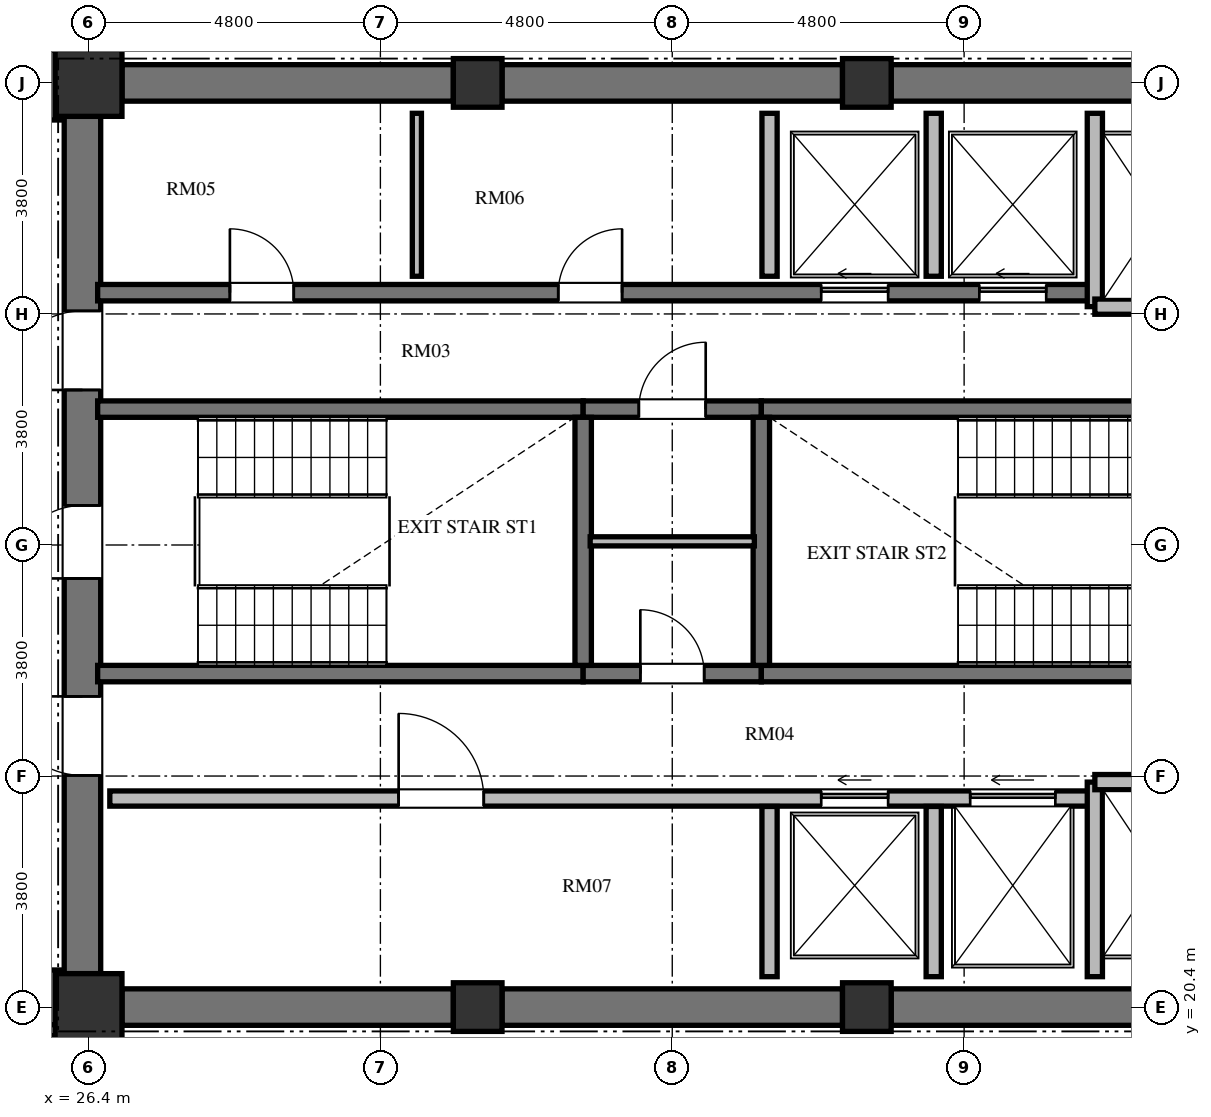
"""IFC4 building model, lengths in metres.
Left out: names, types, materials, properties, quantities, classifications, styles, units other than length and angle.
Written with IfcOpenShell. Run it as: python <this file> out.ifc"""

import sys

from ifc_helpers import new_model, si_unit, direction, frame, frame_2d, origin, origin_2d, place, context, subcontext, project, spatial, rectangle, extrude, element, fill, save


model = new_model("IFC4")
c1 = context("Model", 3, precision=1e-05, world=origin(), true_north=direction((0.0, 1.0)))
c2 = subcontext(c1, "Body", "Model", "MODEL_VIEW")
j1 = project(units=[si_unit("LENGTHUNIT", "METRE"), si_unit("PLANEANGLEUNIT", "RADIAN")], contexts=[c1])
p1 = place(None, origin())
s1 = spatial("IfcSite", under=j1, at=p1, CompositionType="ELEMENT")
p2 = place(p1, origin())
s2 = spatial("IfcBuilding", under=s1, at=p2, CompositionType="ELEMENT")
p3 = place(p2, frame((0.0, 0.0, 205.776)))
s3 = spatial("IfcBuildingStorey", under=s2, at=p3, CompositionType="ELEMENT", Elevation=205.776)
p4 = place(p3, frame((26.4, 20.4, 0.0), z_axis=(0.0, 0.0, 1.0), x_axis=(1.0, 0.0, 0.0)))
e1 = element("IfcColumn", 1, at=p4, inside=s3, PredefinedType="COLUMN", context=c2, shape_type="SweptSolid", body=[
    extrude(rectangle(XDim=1.1, YDim=1.1, at=origin_2d()), origin(), (0.0, 0.0, 1.0), 3.648),
])
for number, where, z_axis, x_axis in (
    (2, (32.8, 20.4, 0.0), (0.0, 0.0, 1.0), (1.0, 0.0, 0.0)),
    (3, (39.2, 20.4, 0.0), (0.0, 0.0, 1.0), (1.0, 0.0, 0.0)),
    (4, (39.2, 35.6, 0.0), (0.0, 0.0, 1.0), (1.0, 0.0, 0.0)),
    (5, (32.8, 35.6, 0.0), (0.0, 0.0, 1.0), (1.0, 0.0, 0.0)),
):
    element("IfcColumn", number, at=place(p3, frame(where, z_axis=z_axis, x_axis=x_axis)), inside=s3, PredefinedType="COLUMN", context=c2, shape_type="SweptSolid", body=[
        extrude(rectangle(XDim=0.8, YDim=0.8, at=origin_2d()), origin(), (0.0, 0.0, 1.0), 3.648),
    ])
p5 = place(p3, frame((26.4, 35.6, 0.0), z_axis=(0.0, 0.0, 1.0), x_axis=(1.0, 0.0, 0.0)))
e6 = element("IfcColumn", 6, at=p5, inside=s3, PredefinedType="COLUMN", context=c2, shape_type="SweptSolid", body=[
    extrude(rectangle(XDim=1.1, YDim=1.1, at=origin_2d()), origin(), (0.0, 0.0, 1.0), 3.648),
])
p6 = place(p3, frame((26.3, 20.95, 0.0), z_axis=(0.0, 0.0, 1.0), x_axis=(0.0, 1.0, 0.0)))
e7 = element("IfcWall", 7, at=p6, inside=s3, PredefinedType="SHEAR", context=c2, shape_type="SweptSolid", body=[
    extrude(rectangle(XDim=14.1, YDim=0.6, at=frame_2d((7.05, 0.0))), origin(), (0.0, 0.0, 1.0), 3.648),
])
p7 = place(p6, frame((6.5, 0.0, 0.0)))
e8 = element("IfcOpeningElement", 8, at=p7, cuts=e7, PredefinedType="OPENING", context=c2, shape_type="SweptSolid", body=[
    extrude(rectangle(XDim=1.2, YDim=2.15, at=frame_2d((0.6, 1.075))), frame((0.0, 0.31, 0.0), z_axis=(0.0, -1.0, 0.0), x_axis=(1.0, 0.0, 0.0)), (0.0, 0.0, 1.0), 0.62),
])
p8 = place(p6, frame((9.6, 0.0, 0.0)))
e9 = element("IfcOpeningElement", 9, at=p8, cuts=e7, PredefinedType="OPENING", context=c2, shape_type="SweptSolid", body=[
    extrude(rectangle(XDim=1.3, YDim=2.2, at=frame_2d((0.65, 1.1))), frame((0.0, 0.31, 0.0), z_axis=(0.0, -1.0, 0.0), x_axis=(1.0, 0.0, 0.0)), (0.0, 0.0, 1.0), 0.62),
])
p9 = place(p6, frame((3.26, 0.0, 0.0)))
e10 = element("IfcOpeningElement", 10, at=p9, cuts=e7, PredefinedType="OPENING", context=c2, shape_type="SweptSolid", body=[
    extrude(rectangle(XDim=1.3, YDim=2.2, at=frame_2d((0.65, 1.1))), frame((0.0, 0.31, 0.0), z_axis=(0.0, -1.0, 0.0), x_axis=(1.0, 0.0, 0.0)), (0.0, 0.0, 1.0), 0.62),
])
for number, where, z_axis, x_axis in (
    (11, (26.95, 20.4, 0.0), (0.0, 0.0, 1.0), (1.0, 0.0, 0.0)),
    (12, (26.95, 35.6, 0.0), (0.0, 0.0, 1.0), (1.0, 0.0, 0.0)),
):
    element("IfcWall", number, at=place(p3, frame(where, z_axis=z_axis, x_axis=x_axis)), inside=s3, PredefinedType="SHEAR", context=c2, shape_type="SweptSolid", body=[
        extrude(rectangle(XDim=5.45, YDim=0.6, at=frame_2d((2.725, 0.0))), origin(), (0.0, 0.0, 1.0), 3.648),
    ])
for number, where, z_axis, x_axis in (
    (13, (33.2, 20.4, 0.0), (0.0, 0.0, 1.0), (1.0, 0.0, 0.0)),
    (14, (33.2, 35.6, 0.0), (0.0, 0.0, 1.0), (1.0, 0.0, 0.0)),
):
    element("IfcWall", number, at=place(p3, frame(where, z_axis=z_axis, x_axis=x_axis)), inside=s3, PredefinedType="SHEAR", context=c2, shape_type="SweptSolid", body=[
        extrude(rectangle(XDim=5.6, YDim=0.6, at=frame_2d((2.8, 0.0))), origin(), (0.0, 0.0, 1.0), 3.648),
    ])
for number, where, z_axis, x_axis in (
    (15, (39.6, 20.4, 0.0), (0.0, 0.0, 1.0), (1.0, 0.0, 0.0)),
    (16, (39.6, 35.6, 0.0), (0.0, 0.0, 1.0), (1.0, 0.0, 0.0)),
):
    element("IfcWall", number, at=place(p3, frame(where, z_axis=z_axis, x_axis=x_axis)), inside=s3, PredefinedType="SHEAR", context=c2, shape_type="SweptSolid", body=[
        extrude(rectangle(XDim=5.45, YDim=0.6, at=frame_2d((2.725, 0.0))), origin(), (0.0, 0.0, 1.0), 3.648),
    ])
p10 = place(p3, frame((26.55, 30.235, 0.0), z_axis=(0.0, 0.0, 1.0), x_axis=(1.0, 0.0, 0.0)))
e17 = element("IfcWall", 17, at=p10, inside=s3, PredefinedType="SHEAR", context=c2, shape_type="SweptSolid", body=[
    extrude(rectangle(XDim=7.985, YDim=0.27, at=frame_2d((3.992, 0.0))), origin(), (0.0, 0.0, 1.0), 3.648),
])
p11 = place(p3, frame((34.535, 30.235, 0.0), z_axis=(0.0, 0.0, 1.0), x_axis=(1.0, 0.0, 0.0)))
e18 = element("IfcWall", 18, at=p11, inside=s3, PredefinedType="SHEAR", context=c2, shape_type="SweptSolid", body=[
    extrude(rectangle(XDim=2.93, YDim=0.27, at=frame_2d((1.465, 0.0))), origin(), (0.0, 0.0, 1.0), 3.648),
])
p12 = place(p11, frame((0.915, 0.0, 0.0)))
e19 = element("IfcOpeningElement", 19, at=p12, cuts=e18, PredefinedType="OPENING", context=c2, shape_type="SweptSolid", body=[
    extrude(rectangle(XDim=1.1, YDim=2.15, at=frame_2d((0.55, 1.075))), frame((0.0, 0.145, 0.0), z_axis=(0.0, -1.0, 0.0), x_axis=(1.0, 0.0, 0.0)), (0.0, 0.0, 1.0), 0.29),
])
p13 = place(p3, frame((37.465, 30.235, 0.0), z_axis=(0.0, 0.0, 1.0), x_axis=(1.0, 0.0, 0.0)))
e20 = element("IfcWall", 20, at=p13, inside=s3, PredefinedType="SHEAR", context=c2, shape_type="SweptSolid", body=[
    extrude(rectangle(XDim=7.985, YDim=0.27, at=frame_2d((3.992, 0.0))), origin(), (0.0, 0.0, 1.0), 3.648),
])
p14 = place(p13, frame((6.455, 0.0, 0.0)))
e21 = element("IfcOpeningElement", 21, at=p14, cuts=e20, PredefinedType="OPENING", context=c2, shape_type="SweptSolid", body=[
    extrude(rectangle(XDim=1.2, YDim=2.15, at=frame_2d((0.6, 1.075))), frame((0.0, 0.145, 0.0), z_axis=(0.0, -1.0, 0.0), x_axis=(1.0, 0.0, 0.0)), (0.0, 0.0, 1.0), 0.29),
])
p15 = place(p3, frame((26.55, 25.885, 0.0), z_axis=(0.0, 0.0, 1.0), x_axis=(1.0, 0.0, 0.0)))
e22 = element("IfcWall", 22, at=p15, inside=s3, PredefinedType="SHEAR", context=c2, shape_type="SweptSolid", body=[
    extrude(rectangle(XDim=7.985, YDim=0.27, at=frame_2d((3.992, 0.0))), origin(), (0.0, 0.0, 1.0), 3.648),
])
p16 = place(p3, frame((34.535, 25.885, 0.0), z_axis=(0.0, 0.0, 1.0), x_axis=(1.0, 0.0, 0.0)))
e23 = element("IfcWall", 23, at=p16, inside=s3, PredefinedType="SHEAR", context=c2, shape_type="SweptSolid", body=[
    extrude(rectangle(XDim=2.93, YDim=0.27, at=frame_2d((1.465, 0.0))), origin(), (0.0, 0.0, 1.0), 3.648),
])
p17 = place(p16, frame((0.94, 0.0, 0.0)))
e24 = element("IfcOpeningElement", 24, at=p17, cuts=e23, PredefinedType="OPENING", context=c2, shape_type="SweptSolid", body=[
    extrude(rectangle(XDim=1.05, YDim=2.15, at=frame_2d((0.525, 1.075))), frame((0.0, 0.145, 0.0), z_axis=(0.0, -1.0, 0.0), x_axis=(1.0, 0.0, 0.0)), (0.0, 0.0, 1.0), 0.29),
])
p18 = place(p3, frame((37.465, 25.885, 0.0), z_axis=(0.0, 0.0, 1.0), x_axis=(1.0, 0.0, 0.0)))
e25 = element("IfcWall", 25, at=p18, inside=s3, PredefinedType="SHEAR", context=c2, shape_type="SweptSolid", body=[
    extrude(rectangle(XDim=7.985, YDim=0.27, at=frame_2d((3.992, 0.0))), origin(), (0.0, 0.0, 1.0), 3.648),
])
for number, where, z_axis, x_axis in (
    (26, (34.535, 26.02, 0.0), (0.0, 0.0, 1.0), (0.0, 1.0, 0.0)),
    (27, (37.465, 26.02, 0.0), (0.0, 0.0, 1.0), (0.0, 1.0, 0.0)),
):
    element("IfcWall", number, at=place(p3, frame(where, z_axis=z_axis, x_axis=x_axis)), inside=s3, PredefinedType="SHEAR", context=c2, shape_type="SweptSolid", body=[
        extrude(rectangle(XDim=4.08, YDim=0.27, at=frame_2d((2.04, 0.0))), origin(), (0.0, 0.0, 1.0), 3.648),
    ])
p19 = place(p3, frame((34.65, 28.06, 0.0), z_axis=(0.0, 0.0, 1.0), x_axis=(1.0, 0.0, 0.0)))
e28 = element("IfcWall", 28, at=p19, inside=s3, PredefinedType="PARTITIONING", context=c2, shape_type="SweptSolid", body=[
    extrude(rectangle(XDim=2.7, YDim=0.15, at=frame_2d((1.35, 0.0))), origin(), (0.0, 0.0, 1.0), 3.448),
])
p20 = place(p3, frame((26.55, 32.15, 0.0), z_axis=(0.0, 0.0, 1.0), x_axis=(1.0, 0.0, 0.0)))
e29 = element("IfcWall", 29, at=p20, inside=s3, PredefinedType="SHEAR", context=c2, shape_type="SweptSolid", body=[
    extrude(rectangle(XDim=16.4, YDim=0.27, at=frame_2d((8.2, 0.0))), origin(), (0.0, 0.0, 1.0), 3.648),
])
p21 = place(p20, frame((2.175, 0.0, 0.0)))
e30 = element("IfcOpeningElement", 30, at=p21, cuts=e29, PredefinedType="OPENING", context=c2, shape_type="SweptSolid", body=[
    extrude(rectangle(XDim=1.05, YDim=2.15, at=frame_2d((0.525, 1.075))), frame((0.0, 0.145, 0.0), z_axis=(0.0, -1.0, 0.0), x_axis=(1.0, 0.0, 0.0)), (0.0, 0.0, 1.0), 0.29),
])
p22 = place(p20, frame((7.575, 0.0, 0.0)))
e31 = element("IfcOpeningElement", 31, at=p22, cuts=e29, PredefinedType="OPENING", context=c2, shape_type="SweptSolid", body=[
    extrude(rectangle(XDim=1.05, YDim=2.15, at=frame_2d((0.525, 1.075))), frame((0.0, 0.145, 0.0), z_axis=(0.0, -1.0, 0.0), x_axis=(1.0, 0.0, 0.0)), (0.0, 0.0, 1.0), 0.29),
])
p23 = place(p20, frame((11.9, 0.0, 0.0)))
e32 = element("IfcOpeningElement", 32, at=p23, cuts=e29, PredefinedType="OPENING", context=c2, shape_type="SweptSolid", body=[
    extrude(rectangle(XDim=1.1, YDim=2.2, at=frame_2d((0.55, 1.1))), frame((0.0, 0.145, 0.0), z_axis=(0.0, -1.0, 0.0), x_axis=(1.0, 0.0, 0.0)), (0.0, 0.0, 1.0), 0.29),
])
p24 = place(p20, frame((14.5, 0.0, 0.0)))
e33 = element("IfcOpeningElement", 33, at=p24, cuts=e29, PredefinedType="OPENING", context=c2, shape_type="SweptSolid", body=[
    extrude(rectangle(XDim=1.1, YDim=2.2, at=frame_2d((0.55, 1.1))), frame((0.0, 0.145, 0.0), z_axis=(0.0, -1.0, 0.0), x_axis=(1.0, 0.0, 0.0)), (0.0, 0.0, 1.0), 0.29),
])
p25 = place(p3, frame((26.75, 23.83, 0.0), z_axis=(0.0, 0.0, 1.0), x_axis=(1.0, 0.0, 0.0)))
e34 = element("IfcWall", 34, at=p25, inside=s3, PredefinedType="SOLIDWALL", context=c2, shape_type="SweptSolid", body=[
    extrude(rectangle(XDim=16.2, YDim=0.25, at=frame_2d((8.1, 0.0))), origin(), (0.0, 0.0, 1.0), 3.448),
])
p26 = place(p25, frame((4.75, 0.0, 0.0)))
e35 = element("IfcOpeningElement", 35, at=p26, cuts=e34, PredefinedType="OPENING", context=c2, shape_type="SweptSolid", body=[
    extrude(rectangle(XDim=1.4, YDim=2.2, at=frame_2d((0.7, 1.1))), frame((0.0, 0.135, 0.0), z_axis=(0.0, -1.0, 0.0), x_axis=(1.0, 0.0, 0.0)), (0.0, 0.0, 1.0), 0.27),
])
p27 = place(p25, frame((11.7, 0.0, 0.0)))
e36 = element("IfcOpeningElement", 36, at=p27, cuts=e34, PredefinedType="OPENING", context=c2, shape_type="SweptSolid", body=[
    extrude(rectangle(XDim=1.1, YDim=2.2, at=frame_2d((0.55, 1.1))), frame((0.0, 0.135, 0.0), z_axis=(0.0, -1.0, 0.0), x_axis=(1.0, 0.0, 0.0)), (0.0, 0.0, 1.0), 0.27),
])
p28 = place(p25, frame((14.15, 0.0, 0.0)))
e37 = element("IfcOpeningElement", 37, at=p28, cuts=e34, PredefinedType="OPENING", context=c2, shape_type="SweptSolid", body=[
    extrude(rectangle(XDim=1.4, YDim=2.3, at=frame_2d((0.7, 1.15))), frame((0.0, 0.135, 0.0), z_axis=(0.0, -1.0, 0.0), x_axis=(1.0, 0.0, 0.0)), (0.0, 0.0, 1.0), 0.27),
])
p29 = place(p3, frame((42.95, 31.92, 0.0), z_axis=(0.0, 0.0, 1.0), x_axis=(0.0, 1.0, 0.0)))
e38 = element("IfcWall", 38, at=p29, inside=s3, PredefinedType="SOLIDWALL", context=c2, shape_type="SweptSolid", body=[
    extrude(rectangle(XDim=3.18, YDim=0.25, at=frame_2d((1.59, 0.0))), origin(), (0.0, 0.0, 1.0), 3.448),
])
p30 = place(p3, frame((42.95, 31.92, 0.0), z_axis=(0.0, 0.0, 1.0), x_axis=(1.0, 0.0, 0.0)))
e39 = element("IfcWall", 39, at=p30, inside=s3, PredefinedType="SOLIDWALL", context=c2, shape_type="SweptSolid", body=[
    extrude(rectangle(XDim=2.3, YDim=0.25, at=frame_2d((1.15, 0.0))), origin(), (0.0, 0.0, 1.0), 3.448),
])
p31 = place(p3, frame((42.95, 20.9, 0.0), z_axis=(0.0, 0.0, 1.0), x_axis=(0.0, 1.0, 0.0)))
e40 = element("IfcWall", 40, at=p31, inside=s3, PredefinedType="SOLIDWALL", context=c2, shape_type="SweptSolid", body=[
    extrude(rectangle(XDim=3.2, YDim=0.25, at=frame_2d((1.6, 0.0))), origin(), (0.0, 0.0, 1.0), 3.448),
])
p32 = place(p3, frame((42.95, 24.1, 0.0), z_axis=(0.0, 0.0, 1.0), x_axis=(1.0, 0.0, 0.0)))
e41 = element("IfcWall", 41, at=p32, inside=s3, PredefinedType="SOLIDWALL", context=c2, shape_type="SweptSolid", body=[
    extrude(rectangle(XDim=2.3, YDim=0.25, at=frame_2d((1.15, 0.0))), origin(), (0.0, 0.0, 1.0), 3.448),
])
p33 = place(p3, frame((37.6, 32.42, 0.0), z_axis=(0.0, 0.0, 1.0), x_axis=(0.0, 1.0, 0.0)))
e42 = element("IfcWall", 42, at=p33, inside=s3, PredefinedType="SOLIDWALL", context=c2, shape_type="SweptSolid", body=[
    extrude(rectangle(XDim=2.68, YDim=0.25, at=frame_2d((1.34, 0.0))), origin(), (0.0, 0.0, 1.0), 3.448),
])
p34 = place(p3, frame((37.6, 20.9, 0.0), z_axis=(0.0, 0.0, 1.0), x_axis=(0.0, 1.0, 0.0)))
e43 = element("IfcWall", 43, at=p34, inside=s3, PredefinedType="SOLIDWALL", context=c2, shape_type="SweptSolid", body=[
    extrude(rectangle(XDim=2.8, YDim=0.25, at=frame_2d((1.4, 0.0))), origin(), (0.0, 0.0, 1.0), 3.448),
])
p35 = place(p3, frame((40.3, 32.42, 0.0), z_axis=(0.0, 0.0, 1.0), x_axis=(0.0, 1.0, 0.0)))
e44 = element("IfcWall", 44, at=p35, inside=s3, PredefinedType="SOLIDWALL", context=c2, shape_type="SweptSolid", body=[
    extrude(rectangle(XDim=2.68, YDim=0.25, at=frame_2d((1.34, 0.0))), origin(), (0.0, 0.0, 1.0), 3.448),
])
p36 = place(p3, frame((40.3, 20.9, 0.0), z_axis=(0.0, 0.0, 1.0), x_axis=(0.0, 1.0, 0.0)))
e45 = element("IfcWall", 45, at=p36, inside=s3, PredefinedType="SOLIDWALL", context=c2, shape_type="SweptSolid", body=[
    extrude(rectangle(XDim=2.8, YDim=0.25, at=frame_2d((1.4, 0.0))), origin(), (0.0, 0.0, 1.0), 3.448),
])
p37 = place(p3, frame((31.8, 32.42, 0.0), z_axis=(0.0, 0.0, 1.0), x_axis=(0.0, 1.0, 0.0)))
e46 = element("IfcWall", 46, at=p37, inside=s3, PredefinedType="PARTITIONING", context=c2, shape_type="SweptSolid", body=[
    extrude(rectangle(XDim=2.68, YDim=0.15, at=frame_2d((1.34, 0.0))), origin(), (0.0, 0.0, 1.0), 3.448),
])
p38 = place(p3, frame((25.83, 36.14, 0.0), z_axis=(0.0, 0.0, 1.0), x_axis=(0.0, -1.0, 0.0)))
e47 = element("IfcWall", 47, at=p38, inside=s3, PredefinedType="PARTITIONING", context=c2, shape_type="SweptSolid", body=[
    extrude(rectangle(XDim=1.15, YDim=0.18, at=frame_2d((0.575, 0.0))), origin(), (0.0, 0.0, 1.0), 3.448),
])
p39 = place(p3, frame((25.83, 21.01, 0.0), z_axis=(0.0, 0.0, 1.0), x_axis=(0.0, -1.0, 0.0)))
e48 = element("IfcWall", 48, at=p39, inside=s3, PredefinedType="PARTITIONING", context=c2, shape_type="SweptSolid", body=[
    extrude(rectangle(XDim=1.03, YDim=0.18, at=frame_2d((0.515, 0.0))), origin(), (0.0, 0.0, 1.0), 3.448),
])
p40 = place(p3, frame((25.87, 20.02, 0.0), z_axis=(0.0, 0.0, 1.0), x_axis=(-1.0, 0.0, 0.0)))
e49 = element("IfcWall", 49, at=p40, inside=s3, PredefinedType="PARTITIONING", context=c2, shape_type="SweptSolid", body=[
    extrude(rectangle(XDim=2.56, YDim=0.18, at=frame_2d((1.28, 0.0))), origin(), (0.0, 0.0, 1.0), 3.448),
])
p41 = place(p7, origin())
e50 = element("IfcDoor", 50, at=p41, inside=s3, OperationType="SINGLE_SWING_LEFT", PredefinedType="DOOR", context=c2, shape_type="SweptSolid", body=[
    extrude(rectangle(XDim=1.2, YDim=2.15, at=frame_2d((0.6, 1.075))), frame((0.0, 0.025, 0.0), z_axis=(0.0, -1.0, 0.0), x_axis=(1.0, 0.0, 0.0)), (0.0, 0.0, 1.0), 0.05),
])
fill(e8, e50)
p42 = place(p17, origin())
e51 = element("IfcDoor", 51, at=p42, inside=s3, OperationType="SINGLE_SWING_LEFT", PredefinedType="DOOR", context=c2, shape_type="SweptSolid", body=[
    extrude(rectangle(XDim=1.05, YDim=2.15, at=frame_2d((0.525, 1.075))), frame((0.0, 0.025, 0.0), z_axis=(0.0, -1.0, 0.0), x_axis=(1.0, 0.0, 0.0)), (0.0, 0.0, 1.0), 0.05),
])
fill(e24, e51)
p43 = place(p12, origin())
e52 = element("IfcDoor", 52, at=p43, inside=s3, OperationType="SINGLE_SWING_RIGHT", PredefinedType="DOOR", context=c2, shape_type="SweptSolid", body=[
    extrude(rectangle(XDim=1.1, YDim=2.15, at=frame_2d((0.55, 1.075))), frame((0.0, 0.025, 0.0), z_axis=(0.0, -1.0, 0.0), x_axis=(1.0, 0.0, 0.0)), (0.0, 0.0, 1.0), 0.05),
])
fill(e19, e52)
p44 = place(p8, origin())
e53 = element("IfcDoor", 53, at=p44, inside=s3, OperationType="SINGLE_SWING_LEFT", PredefinedType="DOOR", context=c2, shape_type="SweptSolid", body=[
    extrude(rectangle(XDim=1.3, YDim=2.2, at=frame_2d((0.65, 1.1))), frame((0.0, 0.025, 0.0), z_axis=(0.0, -1.0, 0.0), x_axis=(1.0, 0.0, 0.0)), (0.0, 0.0, 1.0), 0.05),
])
fill(e9, e53)
p45 = place(p9, origin())
e54 = element("IfcDoor", 54, at=p45, inside=s3, OperationType="SINGLE_SWING_RIGHT", PredefinedType="DOOR", context=c2, shape_type="SweptSolid", body=[
    extrude(rectangle(XDim=1.3, YDim=2.2, at=frame_2d((0.65, 1.1))), frame((0.0, 0.025, 0.0), z_axis=(0.0, -1.0, 0.0), x_axis=(1.0, 0.0, 0.0)), (0.0, 0.0, 1.0), 0.05),
])
fill(e10, e54)
p46 = place(p21, origin())
e55 = element("IfcDoor", 55, at=p46, inside=s3, OperationType="SINGLE_SWING_LEFT", PredefinedType="DOOR", context=c2, shape_type="SweptSolid", body=[
    extrude(rectangle(XDim=1.05, YDim=2.15, at=frame_2d((0.525, 1.075))), frame((0.0, 0.025, 0.0), z_axis=(0.0, -1.0, 0.0), x_axis=(1.0, 0.0, 0.0)), (0.0, 0.0, 1.0), 0.05),
])
fill(e30, e55)
p47 = place(p22, origin())
e56 = element("IfcDoor", 56, at=p47, inside=s3, OperationType="SINGLE_SWING_RIGHT", PredefinedType="DOOR", context=c2, shape_type="SweptSolid", body=[
    extrude(rectangle(XDim=1.05, YDim=2.15, at=frame_2d((0.525, 1.075))), frame((0.0, 0.025, 0.0), z_axis=(0.0, -1.0, 0.0), x_axis=(1.0, 0.0, 0.0)), (0.0, 0.0, 1.0), 0.05),
])
fill(e31, e56)
p48 = place(p26, origin())
e57 = element("IfcDoor", 57, at=p48, inside=s3, OperationType="SINGLE_SWING_LEFT", PredefinedType="DOOR", context=c2, shape_type="SweptSolid", body=[
    extrude(rectangle(XDim=1.4, YDim=2.2, at=frame_2d((0.7, 1.1))), frame((0.0, 0.025, 0.0), z_axis=(0.0, -1.0, 0.0), x_axis=(1.0, 0.0, 0.0)), (0.0, 0.0, 1.0), 0.05),
])
fill(e35, e57)
p49 = place(p23, origin())
e58 = element("IfcDoor", 58, at=p49, inside=s3, OperationType="SLIDING_TO_LEFT", PredefinedType="DOOR", context=c2, shape_type="SweptSolid", body=[
    extrude(rectangle(XDim=1.1, YDim=2.2, at=frame_2d((0.55, 1.1))), frame((0.0, 0.025, 0.0), z_axis=(0.0, -1.0, 0.0), x_axis=(1.0, 0.0, 0.0)), (0.0, 0.0, 1.0), 0.05),
])
fill(e32, e58)
p50 = place(p24, origin())
e59 = element("IfcDoor", 59, at=p50, inside=s3, OperationType="SLIDING_TO_LEFT", PredefinedType="DOOR", context=c2, shape_type="SweptSolid", body=[
    extrude(rectangle(XDim=1.1, YDim=2.2, at=frame_2d((0.55, 1.1))), frame((0.0, 0.025, 0.0), z_axis=(0.0, -1.0, 0.0), x_axis=(1.0, 0.0, 0.0)), (0.0, 0.0, 1.0), 0.05),
])
fill(e33, e59)
p51 = place(p27, origin())
e60 = element("IfcDoor", 60, at=p51, inside=s3, OperationType="SLIDING_TO_LEFT", PredefinedType="DOOR", context=c2, shape_type="SweptSolid", body=[
    extrude(rectangle(XDim=1.1, YDim=2.2, at=frame_2d((0.55, 1.1))), frame((0.0, 0.025, 0.0), z_axis=(0.0, -1.0, 0.0), x_axis=(1.0, 0.0, 0.0)), (0.0, 0.0, 1.0), 0.05),
])
fill(e36, e60)
p52 = place(p28, origin())
e61 = element("IfcDoor", 61, at=p52, inside=s3, OperationType="SLIDING_TO_LEFT", PredefinedType="DOOR", context=c2, shape_type="SweptSolid", body=[
    extrude(rectangle(XDim=1.4, YDim=2.3, at=frame_2d((0.7, 1.15))), frame((0.0, 0.025, 0.0), z_axis=(0.0, -1.0, 0.0), x_axis=(1.0, 0.0, 0.0)), (0.0, 0.0, 1.0), 0.05),
])
fill(e37, e61)
save(model, sys.argv[1])
